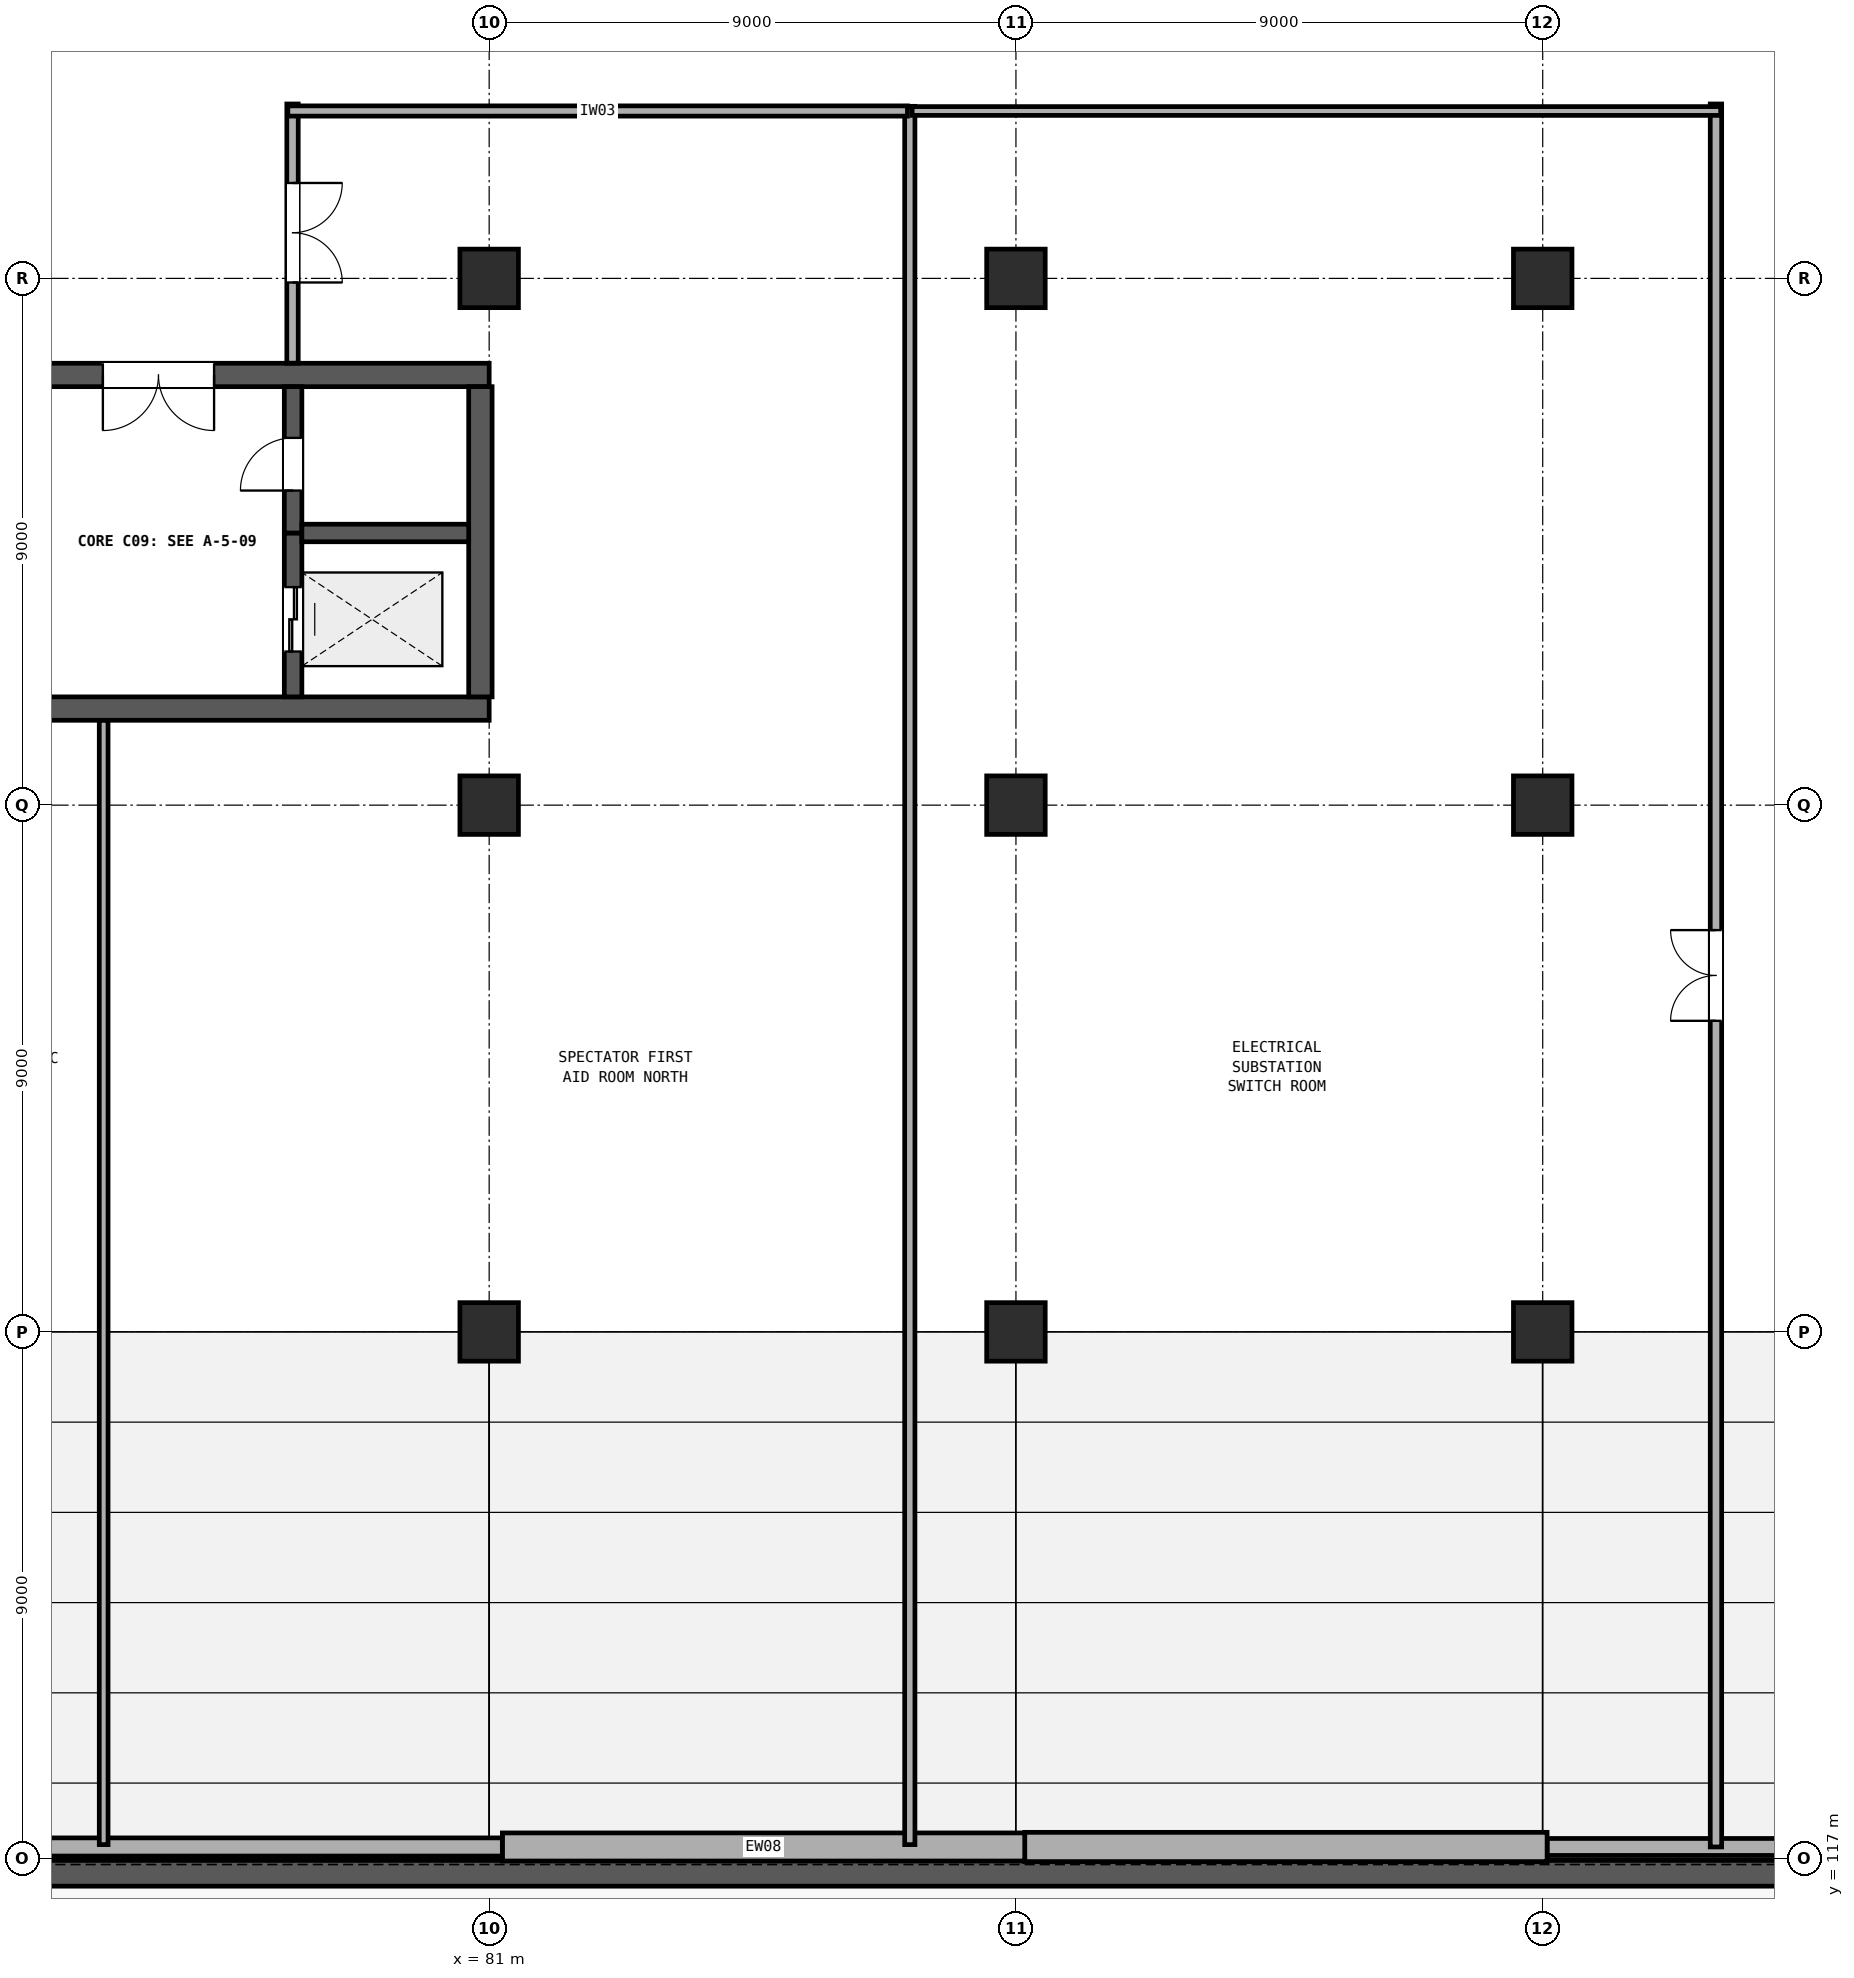
"""IFC4 building model, lengths in metres.
Left out: names, types, materials, properties, quantities, classifications, styles, units other than length and angle.
Written with IfcOpenShell. Run it as: python <this file> out.ifc"""

import sys

from ifc_helpers import new_model, si_unit, direction, frame, frame_2d, origin, origin_2d, place, context, subcontext, project, spatial, rectangle, extrude, element, fill, save


model = new_model("IFC4")
c1 = context("Model", 3, precision=1e-05, world=origin(), true_north=direction((0.0, 1.0)))
c2 = subcontext(c1, "Body", "Model", "MODEL_VIEW")
j1 = project(units=[si_unit("LENGTHUNIT", "METRE"), si_unit("PLANEANGLEUNIT", "RADIAN")], contexts=[c1])
p1 = place(None, origin())
s1 = spatial("IfcSite", under=j1, at=p1, CompositionType="ELEMENT")
p2 = place(p1, origin())
s2 = spatial("IfcBuilding", under=s1, at=p2, CompositionType="ELEMENT")
p3 = place(p2, origin())
s3 = spatial("IfcBuildingStorey", under=s2, at=p3, CompositionType="ELEMENT", Elevation=0.0)
for number, where, z_axis, x_axis in (
    (1, (81.0, 126.0, 0.0), (0.0, 0.0, 1.0), (1.0, 0.0, 0.0)),
    (2, (81.0, 135.0, 0.0), (0.0, 0.0, 1.0), (1.0, 0.0, 0.0)),
    (3, (81.0, 144.0, 0.0), (0.0, 0.0, 1.0), (1.0, 0.0, 0.0)),
    (4, (90.0, 126.0, 0.0), (0.0, 0.0, 1.0), (1.0, 0.0, 0.0)),
    (5, (90.0, 135.0, 0.0), (0.0, 0.0, 1.0), (1.0, 0.0, 0.0)),
    (6, (90.0, 144.0, 0.0), (0.0, 0.0, 1.0), (1.0, 0.0, 0.0)),
    (7, (99.0, 126.0, 0.0), (0.0, 0.0, 1.0), (1.0, 0.0, 0.0)),
    (8, (99.0, 135.0, 0.0), (0.0, 0.0, 1.0), (1.0, 0.0, 0.0)),
    (9, (99.0, 144.0, 0.0), (0.0, 0.0, 1.0), (1.0, 0.0, 0.0)),
):
    element("IfcColumn", number, at=place(p3, frame(where, z_axis=z_axis, x_axis=x_axis)), inside=s3, PredefinedType="COLUMN", context=c2, shape_type="SweptSolid", body=[
        extrude(rectangle(XDim=1.0, YDim=1.0, at=origin_2d()), origin(), (0.0, 0.0, 1.0), 4.8),
    ])
p4 = place(p3, frame((160.9, 116.75, 0.0), z_axis=(0.0, 0.0, 1.0), x_axis=(-1.0, 0.0, 0.0)))
e10 = element("IfcWall", 10, at=p4, inside=s3, PredefinedType="SOLIDWALL", context=c2, shape_type="SweptSolid", body=[
    extrude(rectangle(XDim=105.8, YDim=0.44, at=frame_2d((52.9, 0.0))), origin(), (0.0, 0.0, 1.0), 0.9),
])
p5 = place(p3, frame((63.0, 136.65, 0.0), z_axis=(0.0, 0.0, 1.0), x_axis=(1.0, 0.0, 0.0)))
e11 = element("IfcWall", 11, at=p5, inside=s3, PredefinedType="SHEAR", context=c2, shape_type="SweptSolid", body=[
    extrude(rectangle(XDim=18.0, YDim=0.4, at=frame_2d((9.0, 0.0))), origin(), (0.0, 0.0, 1.0), 4.5),
])
p6 = place(p3, frame((81.0, 142.35, 0.0), z_axis=(0.0, 0.0, 1.0), x_axis=(-1.0, 0.0, 0.0)))
e12 = element("IfcWall", 12, at=p6, inside=s3, PredefinedType="SHEAR", context=c2, shape_type="SweptSolid", body=[
    extrude(rectangle(XDim=18.0, YDim=0.4, at=frame_2d((9.0, 0.0))), origin(), (0.0, 0.0, 1.0), 4.5),
])
p7 = place(p6, frame((4.7, 0.0, 0.0)))
e13 = element("IfcOpeningElement", 13, at=p7, cuts=e12, PredefinedType="OPENING", context=c2, shape_type="SweptSolid", body=[
    extrude(rectangle(XDim=1.9, YDim=2.25, at=frame_2d((0.95, 1.125))), frame((0.0, 0.21, 0.0), z_axis=(0.0, -1.0, 0.0), x_axis=(1.0, 0.0, 0.0)), (0.0, 0.0, 1.0), 0.42),
])
p8 = place(p3, frame((80.85, 136.85, 0.0), z_axis=(0.0, 0.0, 1.0), x_axis=(0.0, 1.0, 0.0)))
e14 = element("IfcWall", 14, at=p8, inside=s3, PredefinedType="SHEAR", context=c2, shape_type="SweptSolid", body=[
    extrude(rectangle(XDim=5.3, YDim=0.4, at=frame_2d((2.65, 0.0))), origin(), (0.0, 0.0, 1.0), 4.5),
])
p9 = place(p3, frame((77.65, 136.85, 0.0), z_axis=(0.0, 0.0, 1.0), x_axis=(0.0, 1.0, 0.0)))
e15 = element("IfcWall", 15, at=p9, inside=s3, PredefinedType="SHEAR", context=c2, shape_type="SweptSolid", body=[
    extrude(rectangle(XDim=2.8, YDim=0.3, at=frame_2d((1.4, 0.0))), origin(), (0.0, 0.0, 1.0), 4.5),
])
p10 = place(p9, frame((0.775, 0.0, 0.0)))
e16 = element("IfcOpeningElement", 16, at=p10, cuts=e15, PredefinedType="OPENING", context=c2, shape_type="SweptSolid", body=[
    extrude(rectangle(XDim=1.1, YDim=2.1, at=frame_2d((0.55, 1.05))), frame((0.0, 0.16, 0.0), z_axis=(0.0, -1.0, 0.0), x_axis=(1.0, 0.0, 0.0)), (0.0, 0.0, 1.0), 0.32),
])
p11 = place(p3, frame((77.65, 139.65, 0.0), z_axis=(0.0, 0.0, 1.0), x_axis=(0.0, 1.0, 0.0)))
e17 = element("IfcWall", 17, at=p11, inside=s3, PredefinedType="SHEAR", context=c2, shape_type="SweptSolid", body=[
    extrude(rectangle(XDim=2.5, YDim=0.3, at=frame_2d((1.25, 0.0))), origin(), (0.0, 0.0, 1.0), 4.5),
])
p12 = place(p11, frame((0.725, 0.0, 0.0)))
e18 = element("IfcOpeningElement", 18, at=p12, cuts=e17, PredefinedType="OPENING", context=c2, shape_type="SweptSolid", body=[
    extrude(rectangle(XDim=0.9, YDim=2.1, at=frame_2d((0.45, 1.05))), frame((0.0, 0.16, 0.0), z_axis=(0.0, -1.0, 0.0), x_axis=(1.0, 0.0, 0.0)), (0.0, 0.0, 1.0), 0.32),
])
p13 = place(p3, frame((77.8, 139.65, 0.0), z_axis=(0.0, 0.0, 1.0), x_axis=(1.0, 0.0, 0.0)))
e19 = element("IfcWall", 19, at=p13, inside=s3, PredefinedType="SHEAR", context=c2, shape_type="SweptSolid", body=[
    extrude(rectangle(XDim=2.85, YDim=0.3, at=frame_2d((1.425, 0.0))), origin(), (0.0, 0.0, 1.0), 4.5),
])
p14 = place(p3, frame((108.0, 117.2, 0.0), z_axis=(0.0, 0.0, 1.0), x_axis=(-1.0, 0.0, 0.0)))
e20 = element("IfcWall", 20, at=p14, inside=s3, PredefinedType="SOLIDWALL", context=c2, shape_type="SweptSolid", body=[
    extrude(rectangle(XDim=8.925, YDim=0.29, at=frame_2d((4.462, 0.0))), origin(), (0.0, 0.0, 1.0), 3.28),
])
p15 = place(p3, frame((99.075, 117.2, 0.0), z_axis=(0.0, 0.0, 1.0), x_axis=(-1.0, 0.0, 0.0)))
e21 = element("IfcWall", 21, at=p15, inside=s3, PredefinedType="SOLIDWALL", context=c2, shape_type="SweptSolid", body=[
    extrude(rectangle(XDim=8.925, YDim=0.5, at=frame_2d((4.462, 0.0))), origin(), (0.0, 0.0, 1.0), 3.28),
])
p16 = place(p3, frame((90.15, 117.2, 0.0), z_axis=(0.0, 0.0, 1.0), x_axis=(-1.0, 0.0, 0.0)))
e22 = element("IfcWall", 22, at=p16, inside=s3, PredefinedType="SOLIDWALL", context=c2, shape_type="SweptSolid", body=[
    extrude(rectangle(XDim=8.925, YDim=0.48, at=frame_2d((4.462, 0.0))), origin(), (0.0, 0.0, 1.0), 3.28),
])
p17 = place(p3, frame((81.225, 117.2, 0.0), z_axis=(0.0, 0.0, 1.0), x_axis=(-1.0, 0.0, 0.0)))
e23 = element("IfcWall", 23, at=p17, inside=s3, PredefinedType="SOLIDWALL", context=c2, shape_type="SweptSolid", body=[
    extrude(rectangle(XDim=8.925, YDim=0.31, at=frame_2d((4.462, 0.0))), origin(), (0.0, 0.0, 1.0), 3.28),
])
p18 = place(p3, frame((101.96, 117.2, 0.0), z_axis=(0.0, 0.0, 1.0), x_axis=(0.0, 1.0, 0.0)))
e24 = element("IfcWall", 24, at=p18, inside=s3, PredefinedType="PARTITIONING", context=c2, shape_type="SweptSolid", body=[
    extrude(rectangle(XDim=29.78, YDim=0.195, at=frame_2d((14.89, 0.0))), origin(), (0.0, 0.0, 1.0), 3.28),
])
p19 = place(p18, frame((14.115, 0.0, 0.0)))
e25 = element("IfcOpeningElement", 25, at=p19, cuts=e24, PredefinedType="OPENING", context=c2, shape_type="SweptSolid", body=[
    extrude(rectangle(XDim=1.55, YDim=2.2, at=frame_2d((0.775, 1.1))), frame((0.0, 0.107, 0.0), z_axis=(0.0, -1.0, 0.0), x_axis=(1.0, 0.0, 0.0)), (0.0, 0.0, 1.0), 0.215),
])
p20 = place(p3, frame((88.187, 117.24, 0.0), z_axis=(0.0, 0.0, 1.0), x_axis=(0.0, 1.0, 0.0)))
e26 = element("IfcWall", 26, at=p20, inside=s3, PredefinedType="PARTITIONING", context=c2, shape_type="SweptSolid", body=[
    extrude(rectangle(XDim=29.7, YDim=0.175, at=frame_2d((14.85, 0.0))), origin(), (0.0, 0.0, 1.0), 3.28),
])
p21 = place(p3, frame((88.227, 146.86, 0.0), z_axis=(0.0, 0.0, 1.0), x_axis=(1.0, 0.0, 0.0)))
e27 = element("IfcWall", 27, at=p21, inside=s3, PredefinedType="PARTITIONING", context=c2, shape_type="SweptSolid", body=[
    extrude(rectangle(XDim=13.813, YDim=0.15, at=frame_2d((6.907, 0.0))), origin(), (0.0, 0.0, 1.0), 3.28),
])
p22 = place(p3, frame((77.64, 146.98, 0.0), z_axis=(0.0, 0.0, 1.0), x_axis=(0.0, -1.0, 0.0)))
e28 = element("IfcWall", 28, at=p22, inside=s3, PredefinedType="PARTITIONING", context=c2, shape_type="SweptSolid", body=[
    extrude(rectangle(XDim=4.428, YDim=0.195, at=frame_2d((2.214, 0.0))), origin(), (0.0, 0.0, 1.0), 3.28),
])
p23 = place(p22, frame((1.35, 0.0, 0.0)))
e29 = element("IfcOpeningElement", 29, at=p23, cuts=e28, PredefinedType="OPENING", context=c2, shape_type="SweptSolid", body=[
    extrude(rectangle(XDim=1.7, YDim=2.2, at=frame_2d((0.85, 1.1))), frame((0.0, 0.107, 0.0), z_axis=(0.0, -1.0, 0.0), x_axis=(1.0, 0.0, 0.0)), (0.0, 0.0, 1.0), 0.215),
])
p24 = place(p3, frame((77.56, 146.86, 0.0), z_axis=(0.0, 0.0, 1.0), x_axis=(1.0, 0.0, 0.0)))
e30 = element("IfcWall", 30, at=p24, inside=s3, PredefinedType="PARTITIONING", context=c2, shape_type="SweptSolid", body=[
    extrude(rectangle(XDim=10.587, YDim=0.175, at=frame_2d((5.293, 0.0))), origin(), (0.0, 0.0, 1.0), 3.28),
])
p25 = place(p3, frame((74.413, 117.24, 0.0), z_axis=(0.0, 0.0, 1.0), x_axis=(0.0, 1.0, 0.0)))
e31 = element("IfcWall", 31, at=p25, inside=s3, PredefinedType="PARTITIONING", context=c2, shape_type="SweptSolid", body=[
    extrude(rectangle(XDim=19.208, YDim=0.15, at=frame_2d((9.604, 0.0))), origin(), (0.0, 0.0, 1.0), 3.28),
])
p26 = place(p12, origin())
e32 = element("IfcDoor", 32, at=p26, inside=s3, OperationType="SINGLE_SWING_LEFT", PredefinedType="DOOR", context=c2, shape_type="SweptSolid", body=[
    extrude(rectangle(XDim=0.9, YDim=2.1, at=frame_2d((0.45, 1.05))), frame((0.0, 0.025, 0.0), z_axis=(0.0, -1.0, 0.0), x_axis=(1.0, 0.0, 0.0)), (0.0, 0.0, 1.0), 0.05),
])
fill(e18, e32)
p27 = place(p10, origin())
e33 = element("IfcDoor", 33, at=p27, inside=s3, OperationType="DOUBLE_DOOR_SLIDING", PredefinedType="DOOR", context=c2, shape_type="SweptSolid", body=[
    extrude(rectangle(XDim=1.1, YDim=2.1, at=frame_2d((0.55, 1.05))), frame((0.0, 0.025, 0.0), z_axis=(0.0, -1.0, 0.0), x_axis=(1.0, 0.0, 0.0)), (0.0, 0.0, 1.0), 0.05),
])
fill(e16, e33)
p28 = place(p7, origin())
e34 = element("IfcDoor", 34, at=p28, inside=s3, OperationType="DOUBLE_DOOR_SINGLE_SWING", PredefinedType="DOOR", context=c2, shape_type="SweptSolid", body=[
    extrude(rectangle(XDim=1.9, YDim=2.25, at=frame_2d((0.95, 1.125))), frame((0.0, 0.025, 0.0), z_axis=(0.0, -1.0, 0.0), x_axis=(1.0, 0.0, 0.0)), (0.0, 0.0, 1.0), 0.05),
])
fill(e13, e34)
p29 = place(p19, origin())
e35 = element("IfcDoor", 35, at=p29, inside=s3, OperationType="DOUBLE_DOOR_SINGLE_SWING", PredefinedType="DOOR", context=c2, shape_type="SweptSolid", body=[
    extrude(rectangle(XDim=1.55, YDim=2.2, at=frame_2d((0.775, 1.1))), frame((0.0, 0.025, 0.0), z_axis=(0.0, -1.0, 0.0), x_axis=(1.0, 0.0, 0.0)), (0.0, 0.0, 1.0), 0.05),
])
fill(e25, e35)
p30 = place(p23, origin())
e36 = element("IfcDoor", 36, at=p30, inside=s3, OperationType="DOUBLE_DOOR_SINGLE_SWING", PredefinedType="DOOR", context=c2, shape_type="SweptSolid", body=[
    extrude(rectangle(XDim=1.7, YDim=2.2, at=frame_2d((0.85, 1.1))), frame((0.0, 0.025, 0.0), z_axis=(0.0, -1.0, 0.0), x_axis=(1.0, 0.0, 0.0)), (0.0, 0.0, 1.0), 0.05),
])
fill(e29, e36)
save(model, sys.argv[1])
